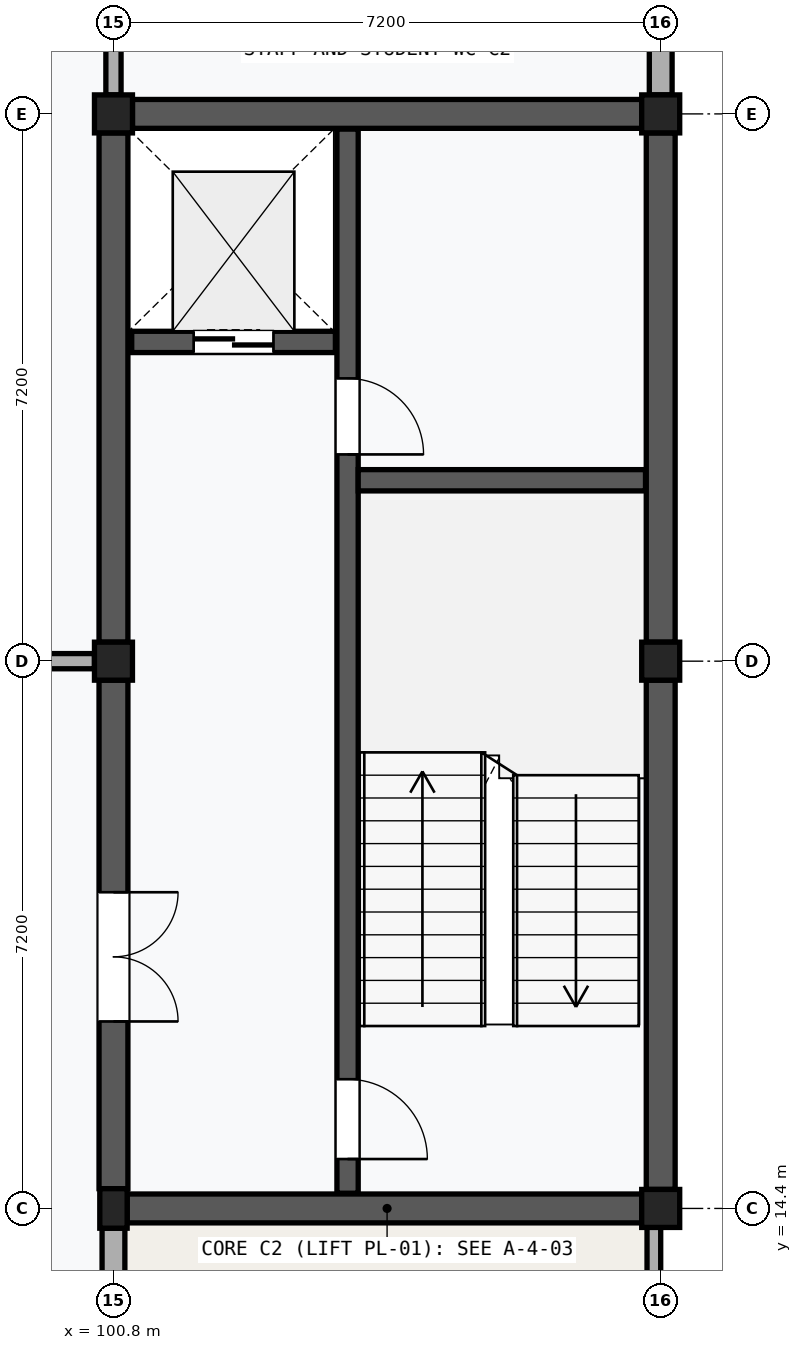
"""IFC4 building model, lengths in metres.
Left out: names, types, materials, properties, quantities, classifications, styles, units other than length and angle.
Written with IfcOpenShell. Run it as: python <this file> out.ifc"""

import sys

from ifc_helpers import new_model, si_unit, direction, frame, frame_2d, origin, origin_2d, place, context, subcontext, project, spatial, rectangle, extrude, element, fill, save


model = new_model("IFC4")
c1 = context("Model", 3, precision=1e-05, world=origin(), true_north=direction((0.0, 1.0)))
c2 = subcontext(c1, "Body", "Model", "MODEL_VIEW")
j1 = project(units=[si_unit("LENGTHUNIT", "METRE"), si_unit("PLANEANGLEUNIT", "RADIAN")], contexts=[c1])
p1 = place(None, origin())
s1 = spatial("IfcSite", under=j1, at=p1, CompositionType="ELEMENT")
p2 = place(p1, origin())
s2 = spatial("IfcBuilding", under=s1, at=p2, CompositionType="ELEMENT")
p3 = place(p2, frame((0.0, 0.0, 51.0)))
s3 = spatial("IfcBuildingStorey", under=s2, at=p3, CompositionType="ELEMENT", Elevation=51.0)
p4 = place(p3, frame((100.8, 14.4, 0.0), z_axis=(0.0, 0.0, 1.0), x_axis=(1.0, 0.0, 0.0)))
e1 = element("IfcColumn", 1, at=p4, inside=s3, PredefinedType="PILASTER", context=c2, shape_type="SweptSolid", body=[
    extrude(rectangle(XDim=0.36, YDim=0.52, at=origin_2d()), origin(), (0.0, 0.0, 1.0), 4.0),
])
for number, where, z_axis, x_axis in (
    (2, (100.8, 21.6, 0.0), (0.0, 0.0, 1.0), (1.0, 0.0, 0.0)),
    (3, (100.8, 28.8, 0.0), (0.0, 0.0, 1.0), (1.0, 0.0, 0.0)),
    (4, (108.0, 14.4, 0.0), (0.0, 0.0, 1.0), (1.0, 0.0, 0.0)),
    (5, (108.0, 21.6, 0.0), (0.0, 0.0, 1.0), (1.0, 0.0, 0.0)),
    (6, (108.0, 28.8, 0.0), (0.0, 0.0, 1.0), (1.0, 0.0, 0.0)),
):
    element("IfcColumn", number, at=place(p3, frame(where, z_axis=z_axis, x_axis=x_axis)), inside=s3, PredefinedType="COLUMN", context=c2, shape_type="SweptSolid", body=[
        extrude(rectangle(XDim=0.5, YDim=0.5, at=origin_2d()), origin(), (0.0, 0.0, 1.0), 4.0),
    ])
p5 = place(p3, frame((100.8, 7.45, 0.0), z_axis=(0.0, 0.0, 1.0), x_axis=(0.0, 1.0, 0.0)))
e7 = element("IfcWall", 7, at=p5, inside=s3, PredefinedType="SOLIDWALL", context=c2, shape_type="SweptSolid", body=[
    extrude(rectangle(XDim=6.69, YDim=0.3, at=frame_2d((3.345, 0.0))), origin(), (0.0, 0.0, 1.0), 3.17),
])
p6 = place(p5, frame((2.245, 0.0, 0.9)))
e8 = element("IfcOpeningElement", 8, at=p6, cuts=e7, PredefinedType="OPENING", context=c2, shape_type="SweptSolid", body=[
    extrude(rectangle(XDim=2.2, YDim=1.8, at=frame_2d((1.1, 0.9))), frame((0.0, 0.162, 0.0), z_axis=(0.0, -1.0, 0.0), x_axis=(1.0, 0.0, 0.0)), (0.0, 0.0, 1.0), 0.324),
])
p7 = place(p3, frame((108.0, 29.05, 0.0), z_axis=(0.0, 0.0, 1.0), x_axis=(0.0, 1.0, 0.0)))
e9 = element("IfcWall", 9, at=p7, inside=s3, PredefinedType="SOLIDWALL", context=c2, shape_type="SweptSolid", body=[
    extrude(rectangle(XDim=6.69, YDim=0.3, at=frame_2d((3.345, 0.0))), origin(), (0.0, 0.0, 1.0), 3.17),
])
p8 = place(p3, frame((107.91, 7.29, 0.0), z_axis=(0.0, 0.0, 1.0), x_axis=(0.0, 1.0, 0.0)))
e10 = element("IfcWall", 10, at=p8, inside=s3, PredefinedType="PARAPET", context=c2, shape_type="SweptSolid", body=[
    extrude(rectangle(XDim=7.02, YDim=0.18, at=frame_2d((3.51, 0.0))), origin(), (0.0, 0.0, 1.0), 0.95),
])
p9 = place(p3, frame((100.8, 14.66, 0.0), z_axis=(0.0, 0.0, 1.0), x_axis=(0.0, 1.0, 0.0)))
e11 = element("IfcWall", 11, at=p9, inside=s3, PredefinedType="SHEAR", context=c2, shape_type="SweptSolid", body=[
    extrude(rectangle(XDim=6.69, YDim=0.38, at=frame_2d((3.345, 0.0))), origin(), (0.0, 0.0, 1.0), 3.09),
])
p10 = place(p9, frame((2.2, 0.0, 0.0)))
e12 = element("IfcOpeningElement", 12, at=p10, cuts=e11, PredefinedType="OPENING", context=c2, shape_type="SweptSolid", body=[
    extrude(rectangle(XDim=1.7, YDim=2.25, at=frame_2d((0.85, 1.125))), frame((0.0, 0.202, 0.0), z_axis=(0.0, -1.0, 0.0), x_axis=(1.0, 0.0, 0.0)), (0.0, 0.0, 1.0), 0.404),
])
p11 = place(p3, frame((100.8, 21.85, 0.0), z_axis=(0.0, 0.0, 1.0), x_axis=(0.0, 1.0, 0.0)))
e13 = element("IfcWall", 13, at=p11, inside=s3, PredefinedType="SHEAR", context=c2, shape_type="SweptSolid", body=[
    extrude(rectangle(XDim=6.7, YDim=0.38, at=frame_2d((3.35, 0.0))), origin(), (0.0, 0.0, 1.0), 3.09),
])
p12 = place(p3, frame((108.0, 14.65, 0.0), z_axis=(0.0, 0.0, 1.0), x_axis=(0.0, 1.0, 0.0)))
e14 = element("IfcWall", 14, at=p12, inside=s3, PredefinedType="SHEAR", context=c2, shape_type="SweptSolid", body=[
    extrude(rectangle(XDim=6.7, YDim=0.38, at=frame_2d((3.35, 0.0))), origin(), (0.0, 0.0, 1.0), 3.17),
])
p13 = place(p3, frame((108.0, 21.85, 0.0), z_axis=(0.0, 0.0, 1.0), x_axis=(0.0, 1.0, 0.0)))
e15 = element("IfcWall", 15, at=p13, inside=s3, PredefinedType="SHEAR", context=c2, shape_type="SweptSolid", body=[
    extrude(rectangle(XDim=6.7, YDim=0.38, at=frame_2d((3.35, 0.0))), origin(), (0.0, 0.0, 1.0), 3.17),
])
p14 = place(p3, frame((100.98, 14.4, 0.0), z_axis=(0.0, 0.0, 1.0), x_axis=(1.0, 0.0, 0.0)))
e16 = element("IfcWall", 16, at=p14, inside=s3, PredefinedType="SHEAR", context=c2, shape_type="SweptSolid", body=[
    extrude(rectangle(XDim=6.77, YDim=0.38, at=frame_2d((3.385, 0.0))), origin(), (0.0, 0.0, 1.0), 3.17),
])
p15 = place(p3, frame((101.05, 28.8, 0.0), z_axis=(0.0, 0.0, 1.0), x_axis=(1.0, 0.0, 0.0)))
e17 = element("IfcWall", 17, at=p15, inside=s3, PredefinedType="SHEAR", context=c2, shape_type="SweptSolid", body=[
    extrude(rectangle(XDim=6.7, YDim=0.38, at=frame_2d((3.35, 0.0))), origin(), (0.0, 0.0, 1.0), 3.09),
])
p16 = place(p3, frame((103.88, 14.6, 0.0), z_axis=(0.0, 0.0, 1.0), x_axis=(0.0, 1.0, 0.0)))
e18 = element("IfcWall", 18, at=p16, inside=s3, PredefinedType="SHEAR", context=c2, shape_type="SweptSolid", body=[
    extrude(rectangle(XDim=14.0, YDim=0.28, at=frame_2d((7.0, 0.0))), origin(), (0.0, 0.0, 1.0), 3.78),
])
p17 = place(p16, frame((0.45, 0.0, 0.0)))
e19 = element("IfcOpeningElement", 19, at=p17, cuts=e18, PredefinedType="OPENING", context=c2, shape_type="SweptSolid", body=[
    extrude(rectangle(XDim=1.05, YDim=2.15, at=frame_2d((0.525, 1.075))), frame((0.0, 0.152, 0.0), z_axis=(0.0, -1.0, 0.0), x_axis=(1.0, 0.0, 0.0)), (0.0, 0.0, 1.0), 0.304),
])
p18 = place(p16, frame((9.72, 0.0, 0.0)))
e20 = element("IfcOpeningElement", 20, at=p18, cuts=e18, PredefinedType="OPENING", context=c2, shape_type="SweptSolid", body=[
    extrude(rectangle(XDim=1.0, YDim=2.15, at=frame_2d((0.5, 1.075))), frame((0.0, 0.152, 0.0), z_axis=(0.0, -1.0, 0.0), x_axis=(1.0, 0.0, 0.0)), (0.0, 0.0, 1.0), 0.304),
])
p19 = place(p3, frame((104.02, 23.98, 0.0), z_axis=(0.0, 0.0, 1.0), x_axis=(1.0, 0.0, 0.0)))
e21 = element("IfcWall", 21, at=p19, inside=s3, PredefinedType="SHEAR", context=c2, shape_type="SweptSolid", body=[
    extrude(rectangle(XDim=3.78, YDim=0.28, at=frame_2d((1.89, 0.0))), origin(), (0.0, 0.0, 1.0), 3.78),
])
p20 = place(p3, frame((101.04, 25.8, 0.0), z_axis=(0.0, 0.0, 1.0), x_axis=(1.0, 0.0, 0.0)))
e22 = element("IfcWall", 22, at=p20, inside=s3, PredefinedType="SHEAR", context=c2, shape_type="SweptSolid", body=[
    extrude(rectangle(XDim=2.68, YDim=0.28, at=frame_2d((1.34, 0.0))), origin(), (0.0, 0.0, 1.0), 3.78),
])
p21 = place(p20, frame((0.815, 0.0, 0.0)))
e23 = element("IfcOpeningElement", 23, at=p21, cuts=e22, PredefinedType="OPENING", context=c2, shape_type="SweptSolid", body=[
    extrude(rectangle(XDim=1.05, YDim=2.2, at=frame_2d((0.525, 1.1))), frame((0.0, 0.152, 0.0), z_axis=(0.0, -1.0, 0.0), x_axis=(1.0, 0.0, 0.0)), (0.0, 0.0, 1.0), 0.304),
])
p22 = place(p3, frame((93.85, 21.6, 0.0), z_axis=(0.0, 0.0, 1.0), x_axis=(1.0, 0.0, 0.0)))
e24 = element("IfcWall", 24, at=p22, inside=s3, PredefinedType="PARTITIONING", context=c2, shape_type="SweptSolid", body=[
    extrude(rectangle(XDim=6.7, YDim=0.2, at=frame_2d((3.35, 0.0))), origin(), (0.0, 0.0, 1.0), 3.09),
])
p23 = place(p22, frame((2.77, 0.0, 0.0)))
e25 = element("IfcOpeningElement", 25, at=p23, cuts=e24, PredefinedType="OPENING", context=c2, shape_type="SweptSolid", body=[
    extrude(rectangle(XDim=1.16, YDim=2.22, at=frame_2d((0.58, 1.11))), frame((0.0, 0.112, 0.0), z_axis=(0.0, -1.0, 0.0), x_axis=(1.0, 0.0, 0.0)), (0.0, 0.0, 1.0), 0.224),
])
p24 = place(p3, frame((100.8, 29.05, 0.0), z_axis=(0.0, 0.0, 1.0), x_axis=(0.0, 1.0, 0.0)))
e26 = element("IfcWall", 26, at=p24, inside=s3, PredefinedType="PARTITIONING", context=c2, shape_type="SweptSolid", body=[
    extrude(rectangle(XDim=6.7, YDim=0.2, at=frame_2d((3.35, 0.0))), origin(), (0.0, 0.0, 1.0), 3.09),
])
p25 = place(p10, frame((1.7, 0.0, 0.0), z_axis=(0.0, 0.0, 1.0), x_axis=(-1.0, 0.0, 0.0)))
e27 = element("IfcDoor", 27, at=p25, inside=s3, OperationType="DOUBLE_DOOR_SINGLE_SWING", PredefinedType="DOOR", context=c2, shape_type="SweptSolid", body=[
    extrude(rectangle(XDim=1.7, YDim=2.25, at=frame_2d((0.85, 1.125))), frame((0.0, 0.025, 0.0), z_axis=(0.0, -1.0, 0.0), x_axis=(1.0, 0.0, 0.0)), (0.0, 0.0, 1.0), 0.05),
])
fill(e12, e27)
p26 = place(p17, frame((1.05, 0.0, 0.0), z_axis=(0.0, 0.0, 1.0), x_axis=(-1.0, 0.0, 0.0)))
e28 = element("IfcDoor", 28, at=p26, inside=s3, OperationType="SINGLE_SWING_RIGHT", PredefinedType="DOOR", context=c2, shape_type="SweptSolid", body=[
    extrude(rectangle(XDim=1.05, YDim=2.15, at=frame_2d((0.525, 1.075))), frame((0.0, 0.025, 0.0), z_axis=(0.0, -1.0, 0.0), x_axis=(1.0, 0.0, 0.0)), (0.0, 0.0, 1.0), 0.05),
])
fill(e19, e28)
p27 = place(p18, frame((1.0, 0.0, 0.0), z_axis=(0.0, 0.0, 1.0), x_axis=(-1.0, 0.0, 0.0)))
e29 = element("IfcDoor", 29, at=p27, inside=s3, OperationType="SINGLE_SWING_RIGHT", PredefinedType="DOOR", context=c2, shape_type="SweptSolid", body=[
    extrude(rectangle(XDim=1.0, YDim=2.15, at=frame_2d((0.5, 1.075))), frame((0.0, 0.025, 0.0), z_axis=(0.0, -1.0, 0.0), x_axis=(1.0, 0.0, 0.0)), (0.0, 0.0, 1.0), 0.05),
])
fill(e20, e29)
p28 = place(p21, frame((1.05, 0.0, 0.0), z_axis=(0.0, 0.0, 1.0), x_axis=(-1.0, 0.0, 0.0)))
e30 = element("IfcDoor", 30, at=p28, inside=s3, OperationType="DOUBLE_DOOR_SLIDING", PredefinedType="DOOR", context=c2, shape_type="SweptSolid", body=[
    extrude(rectangle(XDim=1.05, YDim=2.2, at=frame_2d((0.525, 1.1))), frame((0.0, 0.025, 0.0), z_axis=(0.0, -1.0, 0.0), x_axis=(1.0, 0.0, 0.0)), (0.0, 0.0, 1.0), 0.05),
])
fill(e23, e30)
save(model, sys.argv[1])
